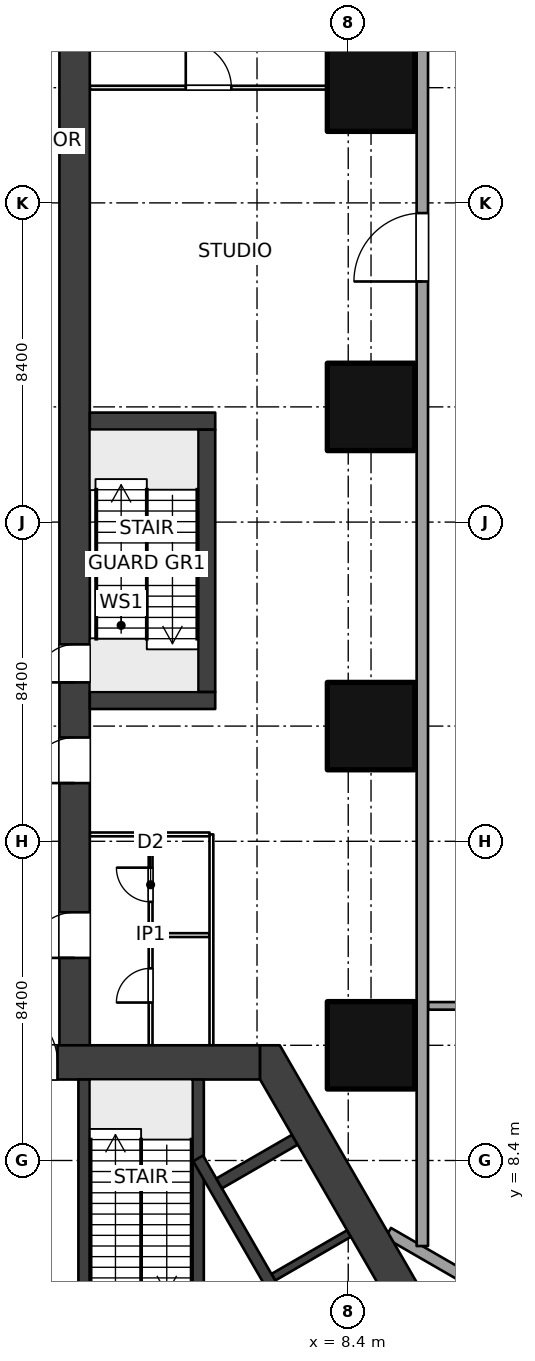
"""IFC4 building model, lengths in metres.
Left out: names, types, materials, properties, quantities, classifications, styles, units other than length and angle.
Written with IfcOpenShell. Run it as: python <this file> out.ifc"""

import sys

from ifc_helpers import new_model, si_unit, direction, frame, frame_2d, origin, origin_2d, place, context, subcontext, project, spatial, polyline, rectangle, outline, extrude, element, fill, save


model = new_model("IFC4")
c1 = context("Model", 3, precision=1e-05, world=origin(), true_north=direction((0.0, 1.0)))
c2 = subcontext(c1, "Body", "Model", "MODEL_VIEW")
j1 = project(units=[si_unit("LENGTHUNIT", "METRE"), si_unit("PLANEANGLEUNIT", "RADIAN")], contexts=[c1])
p1 = place(None, origin())
s1 = spatial("IfcSite", under=j1, at=p1, CompositionType="ELEMENT")
p2 = place(p1, origin())
s2 = spatial("IfcBuilding", under=s1, at=p2, CompositionType="ELEMENT")
p3 = place(p2, frame((0.0, 0.0, 16.0)))
s3 = spatial("IfcBuildingStorey", under=s2, at=p3, CompositionType="ELEMENT", Elevation=16.0)
for number, where, z_axis, x_axis in (
    (1, (9.0, 11.432, 0.0), (0.0, 0.0, 1.0), (1.0, 0.0, 0.0)),
    (2, (9.0, 19.832, 0.0), (0.0, 0.0, 1.0), (1.0, 0.0, 0.0)),
    (3, (9.0, 28.231, 0.0), (0.0, 0.0, 1.0), (1.0, 0.0, 0.0)),
    (4, (9.0, 36.632, 0.0), (0.0, 0.0, 1.0), (1.0, 0.0, 0.0)),
):
    element("IfcColumn", number, at=place(p3, frame(where, z_axis=z_axis, x_axis=x_axis)), inside=s3, PredefinedType="COLUMN", context=c2, shape_type="SweptSolid", body=[
        extrude(rectangle(XDim=2.3, YDim=2.3, at=origin_2d()), origin(), (0.0, 0.0, 1.0), 5.0),
    ])
p4 = place(p3, frame((-6.08, 10.981, 0.0), z_axis=(0.0, 0.0, 1.0), x_axis=(1.0, 0.0, 0.0)))
e5 = element("IfcWall", 5, at=p4, inside=s3, PredefinedType="SHEAR", context=c2, shape_type="SweptSolid", body=[
    extrude(rectangle(XDim=12.161, YDim=0.9, at=frame_2d((6.08, 0.0))), origin(), (0.0, 0.0, 1.0), 5.0),
])
p5 = place(p4, frame((5.33, 0.0, 0.0)))
e6 = element("IfcOpeningElement", 6, at=p5, cuts=e5, PredefinedType="OPENING", context=c2, shape_type="SweptSolid", body=[
    extrude(rectangle(XDim=1.5, YDim=2.1, at=frame_2d((0.75, 1.05))), frame((0.0, 0.46, 0.0), z_axis=(0.0, -1.0, 0.0), x_axis=(1.0, 0.0, 0.0)), (0.0, 0.0, 1.0), 0.92),
])
p6 = place(p3, origin())
e7 = element("IfcWall", 7, at=p6, inside=s3, PredefinedType="SHEAR", context=c2, shape_type="SweptSolid", body=[
    extrude(outline(polyline([(13.2, 0.0), (6.6, 11.432), (6.08, 11.432), (6.08, 10.531), (12.161, 0.0), (12.94, -0.45), (13.2, 0.0)])), origin(), (0.0, 0.0, 1.0), 5.0),
])
p7 = place(p3, frame((1.45, 3.63, 0.0), z_axis=(0.0, 0.0, 1.0), x_axis=(0.0, 1.0, 0.0)))
e8 = element("IfcWall", 8, at=p7, inside=s3, PredefinedType="SHEAR", context=c2, shape_type="SweptSolid", body=[
    extrude(rectangle(XDim=6.902, YDim=0.3, at=frame_2d((3.451, 0.0))), origin(), (0.0, 0.0, 1.0), 5.0),
])
p8 = place(p7, frame((0.25, 0.0, 0.0)))
e9 = element("IfcOpeningElement", 9, at=p8, cuts=e8, PredefinedType="OPENING", context=c2, shape_type="SweptSolid", body=[
    extrude(rectangle(XDim=1.0, YDim=2.1, at=frame_2d((0.5, 1.05))), frame((0.0, 0.16, 0.0), z_axis=(0.0, -1.0, 0.0), x_axis=(1.0, 0.0, 0.0)), (0.0, 0.0, 1.0), 0.32),
])
p9 = place(p3, frame((4.45, 3.63, 0.0), z_axis=(0.0, 0.0, 1.0), x_axis=(0.0, 1.0, 0.0)))
e10 = element("IfcWall", 10, at=p9, inside=s3, PredefinedType="SHEAR", context=c2, shape_type="SweptSolid", body=[
    extrude(rectangle(XDim=6.902, YDim=0.3, at=frame_2d((3.451, 0.0))), origin(), (0.0, 0.0, 1.0), 5.0),
])
p10 = place(p3, frame((4.45, 8.455, 0.0), z_axis=(0.0, 0.0, 1.0), x_axis=(0.500002290144, -0.866024081565, 0.0)))
e11 = element("IfcWall", 11, at=p10, inside=s3, PredefinedType="SHEAR", context=c2, shape_type="SweptSolid", body=[
    extrude(rectangle(XDim=10.195, YDim=0.3, at=frame_2d((5.098, 0.0))), origin(), (0.0, 0.0, 1.0), 5.0),
])
p11 = place(p3, frame((5.004, 7.796, 0.0), z_axis=(0.0, 0.0, 1.0), x_axis=(0.866053019151, 0.499952165731, 0.0)))
e12 = element("IfcWall", 12, at=p11, inside=s3, PredefinedType="SHEAR", context=c2, shape_type="SweptSolid", body=[
    extrude(rectangle(XDim=2.3, YDim=0.3, at=frame_2d((1.15, 0.0))), origin(), (0.0, 0.0, 1.0), 5.0),
])
p12 = place(p3, frame((6.429, 5.328, 0.0), z_axis=(0.0, 0.0, 1.0), x_axis=(0.866007057882, 0.500031774688, 0.0)))
e13 = element("IfcWall", 13, at=p12, inside=s3, PredefinedType="SHEAR", context=c2, shape_type="SweptSolid", body=[
    extrude(rectangle(XDim=2.3, YDim=0.2, at=frame_2d((1.15, 0.0))), origin(), (0.0, 0.0, 1.0), 5.0),
])
p13 = place(p3, frame((1.2, 10.981, 0.0), z_axis=(0.0, 0.0, 1.0), x_axis=(0.0, 1.0, 0.0)))
e14 = element("IfcWall", 14, at=p13, inside=s3, PredefinedType="SHEAR", context=c2, shape_type="SweptSolid", body=[
    extrude(rectangle(XDim=36.75, YDim=0.8, at=frame_2d((18.375, 0.0))), origin(), (0.0, 0.0, 1.0), 5.0),
])
p14 = place(p13, frame((10.0, 0.0, 0.0)))
e15 = element("IfcOpeningElement", 15, at=p14, cuts=e14, PredefinedType="OPENING", context=c2, shape_type="SweptSolid", body=[
    extrude(rectangle(XDim=1.0, YDim=2.1, at=frame_2d((0.5, 1.05))), frame((0.0, 0.41, 0.0), z_axis=(0.0, -1.0, 0.0), x_axis=(1.0, 0.0, 0.0)), (0.0, 0.0, 1.0), 0.82),
])
p15 = place(p13, frame((2.75, 0.0, 0.0)))
e16 = element("IfcOpeningElement", 16, at=p15, cuts=e14, PredefinedType="OPENING", context=c2, shape_type="SweptSolid", body=[
    extrude(rectangle(XDim=1.2, YDim=2.1, at=frame_2d((0.6, 1.05))), frame((0.0, 0.41, 0.0), z_axis=(0.0, -1.0, 0.0), x_axis=(1.0, 0.0, 0.0)), (0.0, 0.0, 1.0), 0.82),
])
p16 = place(p13, frame((7.35, 0.0, 0.0)))
e17 = element("IfcOpeningElement", 17, at=p16, cuts=e14, PredefinedType="OPENING", context=c2, shape_type="SweptSolid", body=[
    extrude(rectangle(XDim=1.2, YDim=2.1, at=frame_2d((0.6, 1.05))), frame((0.0, 0.41, 0.0), z_axis=(0.0, -1.0, 0.0), x_axis=(1.0, 0.0, 0.0)), (0.0, 0.0, 1.0), 0.82),
])
p17 = place(p3, frame((3.2, 11.432, 0.0), z_axis=(0.0, 0.0, 1.0), x_axis=(0.0, 1.0, 0.0)))
e18 = element("IfcWall", 18, at=p17, inside=s3, PredefinedType="PARTITIONING", context=c2, shape_type="SweptSolid", body=[
    extrude(rectangle(XDim=5.6, YDim=0.1, at=frame_2d((2.8, 0.0))), origin(), (0.0, 0.0, 1.0), 4.7),
])
p18 = place(p17, frame((1.125, 0.0, 0.0)))
e19 = element("IfcOpeningElement", 19, at=p18, cuts=e18, PredefinedType="OPENING", context=c2, shape_type="SweptSolid", body=[
    extrude(rectangle(XDim=0.9, YDim=2.1, at=frame_2d((0.45, 1.05))), frame((0.0, 0.06, 0.0), z_axis=(0.0, -1.0, 0.0), x_axis=(1.0, 0.0, 0.0)), (0.0, 0.0, 1.0), 0.12),
])
p19 = place(p17, frame((3.775, 0.0, 0.0)))
e20 = element("IfcOpeningElement", 20, at=p19, cuts=e18, PredefinedType="OPENING", context=c2, shape_type="SweptSolid", body=[
    extrude(rectangle(XDim=0.9, YDim=2.1, at=frame_2d((0.45, 1.05))), frame((0.0, 0.06, 0.0), z_axis=(0.0, -1.0, 0.0), x_axis=(1.0, 0.0, 0.0)), (0.0, 0.0, 1.0), 0.12),
])
p20 = place(p3, frame((3.25, 14.332, 0.0), z_axis=(0.0, 0.0, 1.0), x_axis=(1.0, 0.0, 0.0)))
e21 = element("IfcWall", 21, at=p20, inside=s3, PredefinedType="PARTITIONING", context=c2, shape_type="SweptSolid", body=[
    extrude(rectangle(XDim=1.5, YDim=0.1, at=frame_2d((0.75, 0.0))), origin(), (0.0, 0.0, 1.0), 4.7),
])
p21 = place(p3, frame((4.8, 11.432, 0.0), z_axis=(0.0, 0.0, 1.0), x_axis=(0.0, 1.0, 0.0)))
e22 = element("IfcWall", 22, at=p21, inside=s3, PredefinedType="PARTITIONING", context=c2, shape_type="SweptSolid", body=[
    extrude(rectangle(XDim=5.55, YDim=0.1, at=frame_2d((2.775, 0.0))), origin(), (0.0, 0.0, 1.0), 4.7),
])
p22 = place(p3, frame((1.6, 16.981, 0.0), z_axis=(0.0, 0.0, 1.0), x_axis=(1.0, 0.0, 0.0)))
e23 = element("IfcWall", 23, at=p22, inside=s3, PredefinedType="PARTITIONING", context=c2, shape_type="SweptSolid", body=[
    extrude(rectangle(XDim=3.15, YDim=0.1, at=frame_2d((1.575, 0.0))), origin(), (0.0, 0.0, 1.0), 4.7),
])
p23 = place(p3, frame((1.6, 36.632, 0.0), z_axis=(0.0, 0.0, 1.0), x_axis=(1.0, 0.0, 0.0)))
e24 = element("IfcWall", 24, at=p23, inside=s3, PredefinedType="PARTITIONING", context=c2, shape_type="SweptSolid", body=[
    extrude(rectangle(XDim=6.25, YDim=0.1, at=frame_2d((3.125, 0.0))), origin(), (0.0, 0.0, 1.0), 2.9),
])
p24 = place(p23, frame((2.525, 0.0, 0.0)))
e25 = element("IfcOpeningElement", 25, at=p24, cuts=e24, PredefinedType="OPENING", context=c2, shape_type="SweptSolid", body=[
    extrude(rectangle(XDim=1.2, YDim=2.1, at=frame_2d((0.6, 1.05))), frame((0.0, 0.06, 0.0), z_axis=(0.0, -1.0, 0.0), x_axis=(1.0, 0.0, 0.0)), (0.0, 0.0, 1.0), 0.12),
])
p25 = place(p3, frame((10.5, 12.469, 0.0), z_axis=(0.0, 0.0, 1.0), x_axis=(1.0, 0.0, 0.0)))
e26 = element("IfcWall", 26, at=p25, inside=s3, PredefinedType="SOLIDWALL", context=c2, shape_type="SweptSolid", body=[
    extrude(rectangle(XDim=39.737, YDim=0.2, at=frame_2d((19.869, 0.0))), origin(), (0.0, 0.0, 1.0), 4.7),
])
p26 = place(p25, frame((18.0, 0.0, 0.0)))
e27 = element("IfcOpeningElement", 27, at=p26, cuts=e26, PredefinedType="OPENING", context=c2, shape_type="SweptSolid", body=[
    extrude(rectangle(XDim=1.8, YDim=2.4, at=frame_2d((0.9, 1.2))), frame((0.0, 0.11, 0.0), z_axis=(0.0, -1.0, 0.0), x_axis=(1.0, 0.0, 0.0)), (0.0, 0.0, 1.0), 0.22),
])
p27 = place(p3, frame((10.35, 6.149, 0.0), z_axis=(0.0, 0.0, 1.0), x_axis=(0.0, 1.0, 0.0)))
e28 = element("IfcWall", 28, at=p27, inside=s3, PredefinedType="SOLIDWALL", context=c2, shape_type="SweptSolid", body=[
    extrude(rectangle(XDim=41.883, YDim=0.3, at=frame_2d((20.941, 0.0))), origin(), (0.0, 0.0, 1.0), 4.7),
])
p28 = place(p27, frame((25.383, 0.0, 0.0)))
e29 = element("IfcOpeningElement", 29, at=p28, cuts=e28, PredefinedType="OPENING", context=c2, shape_type="SweptSolid", body=[
    extrude(rectangle(XDim=1.8, YDim=2.4, at=frame_2d((0.9, 1.2))), frame((0.0, 0.16, 0.0), z_axis=(0.0, -1.0, 0.0), x_axis=(1.0, 0.0, 0.0)), (0.0, 0.0, 1.0), 0.32),
])
p29 = place(p3, frame((9.45, 6.495, 0.0), z_axis=(0.0, 0.0, 1.0), x_axis=(0.866025301493, -0.500000177174, 0.0)))
e30 = element("IfcWall", 30, at=p29, inside=s3, PredefinedType="SOLIDWALL", context=c2, shape_type="SweptSolid", body=[
    extrude(rectangle(XDim=43.095, YDim=0.3, at=frame_2d((21.548, 0.0))), origin(), (0.0, 0.0, 1.0), 4.7),
])
p30 = place(p29, frame((26.595, 0.0, 0.0)))
e31 = element("IfcOpeningElement", 31, at=p30, cuts=e30, PredefinedType="OPENING", context=c2, shape_type="SweptSolid", body=[
    extrude(rectangle(XDim=1.8, YDim=2.4, at=frame_2d((0.9, 1.2))), frame((0.0, 0.16, 0.0), z_axis=(0.0, -1.0, 0.0), x_axis=(1.0, 0.0, 0.0)), (0.0, 0.0, 1.0), 0.32),
])
for number, where, z_axis, x_axis in (
    (32, (1.6, 20.507, 0.0), (0.0, 0.0, 1.0), (1.0, 0.0, 0.0)),
    (33, (1.6, 27.856, 0.0), (0.0, 0.0, 1.0), (1.0, 0.0, 0.0)),
):
    element("IfcWall", number, at=place(p3, frame(where, z_axis=z_axis, x_axis=x_axis)), inside=s3, PredefinedType="SOLIDWALL", context=c2, shape_type="SweptSolid", body=[
        extrude(rectangle(XDim=3.3, YDim=0.45, at=frame_2d((1.65, 0.0))), origin(), (0.0, 0.0, 1.0), 5.0),
    ])
p31 = place(p3, frame((4.675, 20.731, 0.0), z_axis=(0.0, 0.0, 1.0), x_axis=(0.0, 1.0, 0.0)))
e34 = element("IfcWall", 34, at=p31, inside=s3, PredefinedType="SOLIDWALL", context=c2, shape_type="SweptSolid", body=[
    extrude(rectangle(XDim=6.9, YDim=0.45, at=frame_2d((3.45, 0.0))), origin(), (0.0, 0.0, 1.0), 5.0),
])
p32 = place(p5, origin())
e35 = element("IfcDoor", 35, at=p32, inside=s3, OperationType="DOUBLE_DOOR_DOUBLE_SWING", PredefinedType="DOOR", context=c2, shape_type="SweptSolid", body=[
    extrude(rectangle(XDim=1.5, YDim=2.1, at=frame_2d((0.75, 1.05))), frame((0.0, 0.025, 0.0), z_axis=(0.0, -1.0, 0.0), x_axis=(1.0, 0.0, 0.0)), (0.0, 0.0, 1.0), 0.05),
])
fill(e6, e35)
p33 = place(p14, origin())
e36 = element("IfcDoor", 36, at=p33, inside=s3, OperationType="SINGLE_SWING_LEFT", PredefinedType="DOOR", context=c2, shape_type="SweptSolid", body=[
    extrude(rectangle(XDim=1.0, YDim=2.1, at=frame_2d((0.5, 1.05))), frame((0.0, 0.025, 0.0), z_axis=(0.0, -1.0, 0.0), x_axis=(1.0, 0.0, 0.0)), (0.0, 0.0, 1.0), 0.05),
])
fill(e15, e36)
p34 = place(p18, origin())
e37 = element("IfcDoor", 37, at=p34, inside=s3, OperationType="SINGLE_SWING_LEFT", PredefinedType="DOOR", context=c2, shape_type="SweptSolid", body=[
    extrude(rectangle(XDim=0.9, YDim=2.1, at=frame_2d((0.45, 1.05))), frame((0.0, 0.025, 0.0), z_axis=(0.0, -1.0, 0.0), x_axis=(1.0, 0.0, 0.0)), (0.0, 0.0, 1.0), 0.05),
])
fill(e19, e37)
p35 = place(p19, origin())
e38 = element("IfcDoor", 38, at=p35, inside=s3, OperationType="SINGLE_SWING_RIGHT", PredefinedType="DOOR", context=c2, shape_type="SweptSolid", body=[
    extrude(rectangle(XDim=0.9, YDim=2.1, at=frame_2d((0.45, 1.05))), frame((0.0, 0.025, 0.0), z_axis=(0.0, -1.0, 0.0), x_axis=(1.0, 0.0, 0.0)), (0.0, 0.0, 1.0), 0.05),
])
fill(e20, e38)
p36 = place(p15, origin())
e39 = element("IfcDoor", 39, at=p36, inside=s3, OperationType="DOUBLE_SWING_LEFT", PredefinedType="DOOR", context=c2, shape_type="SweptSolid", body=[
    extrude(rectangle(XDim=1.2, YDim=2.1, at=frame_2d((0.6, 1.05))), frame((0.0, 0.025, 0.0), z_axis=(0.0, -1.0, 0.0), x_axis=(1.0, 0.0, 0.0)), (0.0, 0.0, 1.0), 0.05),
])
fill(e16, e39)
p37 = place(p24, origin())
e40 = element("IfcDoor", 40, at=p37, inside=s3, OperationType="DOUBLE_SWING_LEFT", PredefinedType="DOOR", context=c2, shape_type="SweptSolid", body=[
    extrude(rectangle(XDim=1.2, YDim=2.1, at=frame_2d((0.6, 1.05))), frame((0.0, 0.025, 0.0), z_axis=(0.0, -1.0, 0.0), x_axis=(1.0, 0.0, 0.0)), (0.0, 0.0, 1.0), 0.05),
])
fill(e25, e40)
p38 = place(p16, origin())
e41 = element("IfcDoor", 41, at=p38, inside=s3, OperationType="DOUBLE_SWING_LEFT", PredefinedType="DOOR", context=c2, shape_type="SweptSolid", body=[
    extrude(rectangle(XDim=1.2, YDim=2.1, at=frame_2d((0.6, 1.05))), frame((0.0, 0.025, 0.0), z_axis=(0.0, -1.0, 0.0), x_axis=(1.0, 0.0, 0.0)), (0.0, 0.0, 1.0), 0.05),
])
fill(e17, e41)
p39 = place(p28, origin())
e42 = element("IfcDoor", 42, at=p39, inside=s3, OperationType="DOUBLE_DOOR_DOUBLE_SWING", PredefinedType="DOOR", context=c2, shape_type="SweptSolid", body=[
    extrude(rectangle(XDim=1.8, YDim=2.4, at=frame_2d((0.9, 1.2))), frame((0.0, 0.025, 0.0), z_axis=(0.0, -1.0, 0.0), x_axis=(1.0, 0.0, 0.0)), (0.0, 0.0, 1.0), 0.05),
])
fill(e29, e42)
save(model, sys.argv[1])
